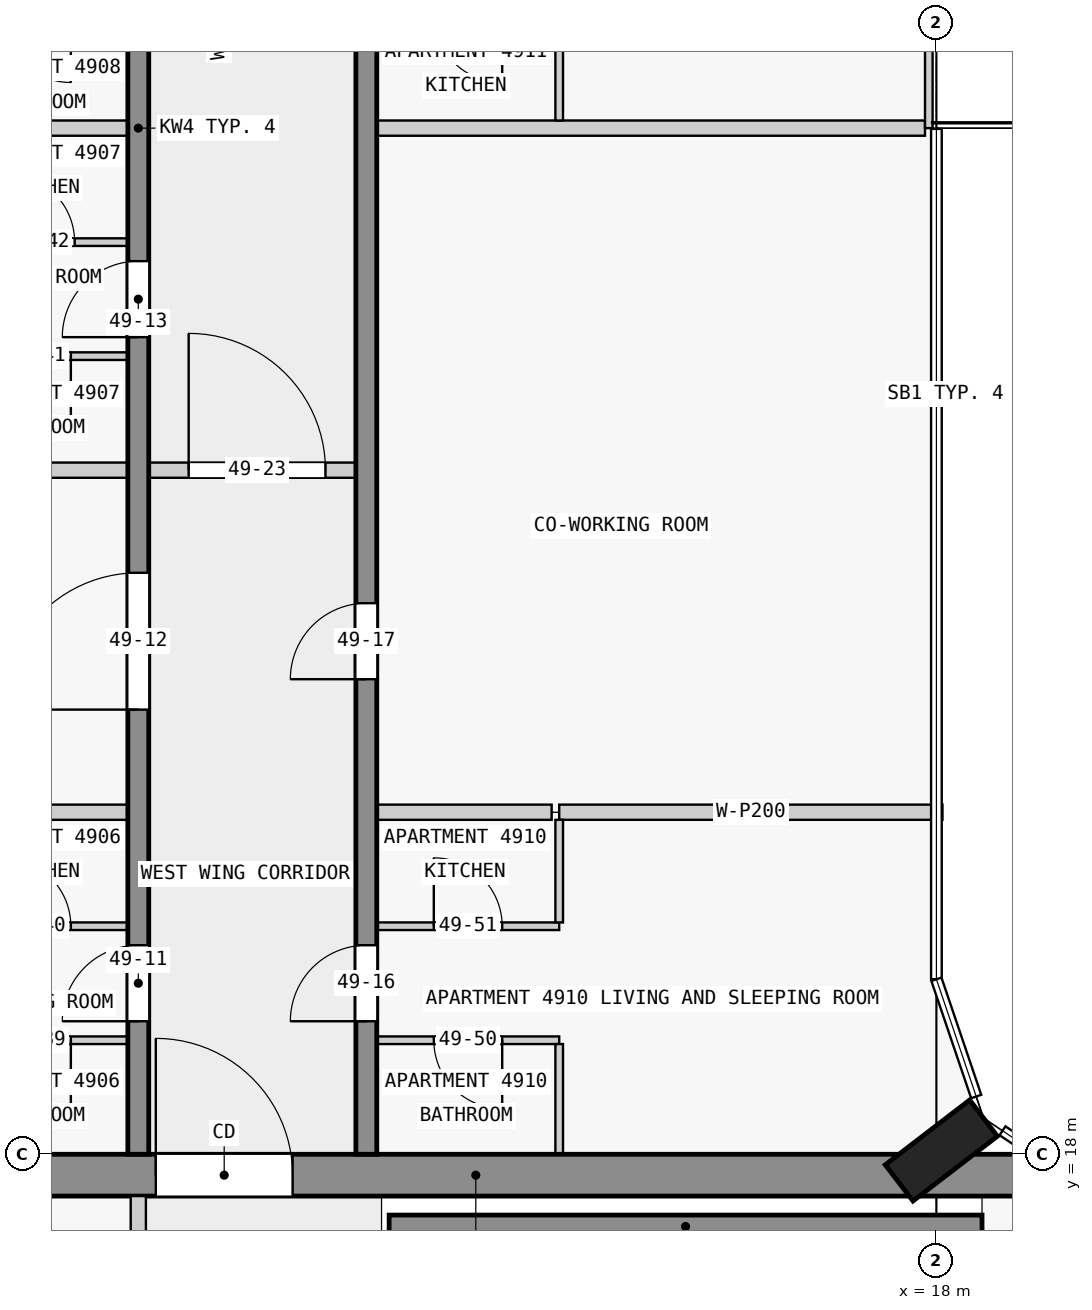
"""IFC4 building model, lengths in metres.
Left out: names, types, materials, properties, quantities, classifications, styles, units other than length and angle.
Written with IfcOpenShell. Run it as: python <this file> out.ifc"""

import sys

from ifc_helpers import new_model, si_unit, direction, frame, frame_2d, origin, origin_2d, place, context, subcontext, project, spatial, rectangle, extrude, element, fill, save


model = new_model("IFC4")
c1 = context("Model", 3, precision=1e-05, world=origin(), true_north=direction((0.0, 1.0)))
c2 = subcontext(c1, "Body", "Model", "MODEL_VIEW")
j1 = project(units=[si_unit("LENGTHUNIT", "METRE"), si_unit("PLANEANGLEUNIT", "RADIAN")], contexts=[c1])
p1 = place(None, origin())
s1 = spatial("IfcSite", under=j1, at=p1, CompositionType="ELEMENT")
p2 = place(p1, origin())
s2 = spatial("IfcBuilding", under=s1, at=p2, CompositionType="ELEMENT")
p3 = place(p2, frame((0.0, 0.0, 190.9)))
s3 = spatial("IfcBuildingStorey", under=s2, at=p3, CompositionType="ELEMENT", Elevation=190.9)
p4 = place(p3, frame((18.065, 18.05, 0.0), z_axis=(0.0, 0.0, 1.0), x_axis=(-0.608810846443, 0.793315418515, 0.0)))
e1 = element("IfcColumn", 1, at=p4, inside=s3, PredefinedType="COLUMN", context=c2, shape_type="SweptSolid", body=[
    extrude(rectangle(XDim=0.6, YDim=1.4, at=origin_2d()), origin(), (0.0, 0.0, 1.0), 3.5),
])
p5 = place(p3, frame((1.38, 17.725, 0.0), z_axis=(0.0, 0.0, 1.0), x_axis=(1.0, 0.0, 0.0)))
e2 = element("IfcWall", 2, at=p5, inside=s3, PredefinedType="SHEAR", context=c2, shape_type="SweptSolid", body=[
    extrude(rectangle(XDim=21.12, YDim=0.55, at=frame_2d((10.56, 0.0))), origin(), (0.0, 0.0, 1.0), 3.25),
])
p6 = place(p5, frame((6.35, 0.0, 0.0)))
e3 = element("IfcOpeningElement", 3, at=p6, cuts=e2, PredefinedType="OPENING", context=c2, shape_type="SweptSolid", body=[
    extrude(rectangle(XDim=1.8, YDim=2.1, at=frame_2d((0.9, 1.05))), frame((0.0, 0.285, 0.0), z_axis=(0.0, -1.0, 0.0), x_axis=(1.0, 0.0, 0.0)), (0.0, 0.0, 1.0), 0.57),
])
p7 = place(p3, frame((10.8, 17.05, 0.0), z_axis=(0.0, 0.0, 1.0), x_axis=(1.0, 0.0, 0.0)))
e4 = element("IfcWall", 4, at=p7, inside=s3, PredefinedType="SHEAR", context=c2, shape_type="SweptSolid", body=[
    extrude(rectangle(XDim=7.8, YDim=0.3, at=frame_2d((3.9, 0.0))), origin(), (0.0, 0.0, 1.0), 3.25),
])
p8 = place(p3, frame((7.5, 18.0, 0.0), z_axis=(0.0, 0.0, 1.0), x_axis=(0.0, 1.0, 0.0)))
e5 = element("IfcWall", 5, at=p8, inside=s3, PredefinedType="SHEAR", context=c2, shape_type="SweptSolid", body=[
    extrude(rectangle(XDim=27.0, YDim=0.275, at=frame_2d((13.5, 0.0))), origin(), (0.0, 0.0, 1.0), 3.25),
])
p9 = place(p8, frame((1.75, 0.0, 0.0)))
e6 = element("IfcOpeningElement", 6, at=p9, cuts=e5, PredefinedType="OPENING", context=c2, shape_type="SweptSolid", body=[
    extrude(rectangle(XDim=1.0, YDim=2.1, at=frame_2d((0.5, 1.05))), frame((0.0, 0.147, 0.0), z_axis=(0.0, -1.0, 0.0), x_axis=(1.0, 0.0, 0.0)), (0.0, 0.0, 1.0), 0.295),
])
p10 = place(p8, frame((5.85, 0.0, 0.0)))
e7 = element("IfcOpeningElement", 7, at=p10, cuts=e5, PredefinedType="OPENING", context=c2, shape_type="SweptSolid", body=[
    extrude(rectangle(XDim=1.8, YDim=2.1, at=frame_2d((0.9, 1.05))), frame((0.0, 0.147, 0.0), z_axis=(0.0, -1.0, 0.0), x_axis=(1.0, 0.0, 0.0)), (0.0, 0.0, 1.0), 0.295),
])
p11 = place(p8, frame((10.75, 0.0, 0.0)))
e8 = element("IfcOpeningElement", 8, at=p11, cuts=e5, PredefinedType="OPENING", context=c2, shape_type="SweptSolid", body=[
    extrude(rectangle(XDim=1.0, YDim=2.1, at=frame_2d((0.5, 1.05))), frame((0.0, 0.147, 0.0), z_axis=(0.0, -1.0, 0.0), x_axis=(1.0, 0.0, 0.0)), (0.0, 0.0, 1.0), 0.295),
])
p12 = place(p8, frame((15.25, 0.0, 0.0)))
e9 = element("IfcOpeningElement", 9, at=p12, cuts=e5, PredefinedType="OPENING", context=c2, shape_type="SweptSolid", body=[
    extrude(rectangle(XDim=1.0, YDim=2.1, at=frame_2d((0.5, 1.05))), frame((0.0, 0.147, 0.0), z_axis=(0.0, -1.0, 0.0), x_axis=(1.0, 0.0, 0.0)), (0.0, 0.0, 1.0), 0.295),
])
p13 = place(p8, frame((21.35, 0.0, 0.0)))
e10 = element("IfcOpeningElement", 10, at=p13, cuts=e5, PredefinedType="OPENING", context=c2, shape_type="SweptSolid", body=[
    extrude(rectangle(XDim=1.0, YDim=2.1, at=frame_2d((0.5, 1.05))), frame((0.0, 0.147, 0.0), z_axis=(0.0, -1.0, 0.0), x_axis=(1.0, 0.0, 0.0)), (0.0, 0.0, 1.0), 0.295),
])
p14 = place(p3, frame((10.5, 18.0, 0.0), z_axis=(0.0, 0.0, 1.0), x_axis=(0.0, 1.0, 0.0)))
e11 = element("IfcWall", 11, at=p14, inside=s3, PredefinedType="SHEAR", context=c2, shape_type="SweptSolid", body=[
    extrude(rectangle(XDim=27.0, YDim=0.275, at=frame_2d((13.5, 0.0))), origin(), (0.0, 0.0, 1.0), 3.25),
])
p15 = place(p14, frame((1.75, 0.0, 0.0)))
e12 = element("IfcOpeningElement", 12, at=p15, cuts=e11, PredefinedType="OPENING", context=c2, shape_type="SweptSolid", body=[
    extrude(rectangle(XDim=1.0, YDim=2.1, at=frame_2d((0.5, 1.05))), frame((0.0, 0.147, 0.0), z_axis=(0.0, -1.0, 0.0), x_axis=(1.0, 0.0, 0.0)), (0.0, 0.0, 1.0), 0.295),
])
p16 = place(p14, frame((6.25, 0.0, 0.0)))
e13 = element("IfcOpeningElement", 13, at=p16, cuts=e11, PredefinedType="OPENING", context=c2, shape_type="SweptSolid", body=[
    extrude(rectangle(XDim=1.0, YDim=2.1, at=frame_2d((0.5, 1.05))), frame((0.0, 0.147, 0.0), z_axis=(0.0, -1.0, 0.0), x_axis=(1.0, 0.0, 0.0)), (0.0, 0.0, 1.0), 0.295),
])
p17 = place(p14, frame((15.25, 0.0, 0.0)))
e14 = element("IfcOpeningElement", 14, at=p17, cuts=e11, PredefinedType="OPENING", context=c2, shape_type="SweptSolid", body=[
    extrude(rectangle(XDim=1.0, YDim=2.1, at=frame_2d((0.5, 1.05))), frame((0.0, 0.147, 0.0), z_axis=(0.0, -1.0, 0.0), x_axis=(1.0, 0.0, 0.0)), (0.0, 0.0, 1.0), 0.295),
])
p18 = place(p14, frame((19.75, 0.0, 0.0)))
e15 = element("IfcOpeningElement", 15, at=p18, cuts=e11, PredefinedType="OPENING", context=c2, shape_type="SweptSolid", body=[
    extrude(rectangle(XDim=1.0, YDim=2.1, at=frame_2d((0.5, 1.05))), frame((0.0, 0.147, 0.0), z_axis=(0.0, -1.0, 0.0), x_axis=(1.0, 0.0, 0.0)), (0.0, 0.0, 1.0), 0.295),
])
p19 = place(p14, frame((23.25, 0.0, 0.0)))
e16 = element("IfcOpeningElement", 16, at=p19, cuts=e11, PredefinedType="OPENING", context=c2, shape_type="SweptSolid", body=[
    extrude(rectangle(XDim=0.9, YDim=2.1, at=frame_2d((0.45, 1.05))), frame((0.0, 0.147, 0.0), z_axis=(0.0, -1.0, 0.0), x_axis=(1.0, 0.0, 0.0)), (0.0, 0.0, 1.0), 0.295),
])
p20 = place(p14, frame((25.45, 0.0, 0.0)))
e17 = element("IfcOpeningElement", 17, at=p20, cuts=e11, PredefinedType="OPENING", context=c2, shape_type="SweptSolid", body=[
    extrude(rectangle(XDim=1.0, YDim=2.1, at=frame_2d((0.5, 1.05))), frame((0.0, 0.147, 0.0), z_axis=(0.0, -1.0, 0.0), x_axis=(1.0, 0.0, 0.0)), (0.0, 0.0, 1.0), 0.295),
])
p21 = place(p3, frame((17.9, 36.0, 0.0), z_axis=(0.0, 0.0, 1.0), x_axis=(0.0, -1.0, 0.0)))
e18 = element("IfcWall", 18, at=p21, inside=s3, PredefinedType="STANDARD", context=c2, shape_type="SweptSolid", body=[
    extrude(rectangle(XDim=4.5, YDim=0.1, at=frame_2d((2.25, 0.0))), origin(), (0.0, 0.0, 1.0), 3.25),
])
p22 = place(p21, frame((1.05, 0.0, 0.0)))
e19 = element("IfcOpeningElement", 19, at=p22, cuts=e18, PredefinedType="OPENING", context=c2, shape_type="SweptSolid", body=[
    extrude(rectangle(XDim=2.4, YDim=2.4, at=frame_2d((1.2, 1.2))), frame((0.0, 0.06, 0.0), z_axis=(0.0, -1.0, 0.0), x_axis=(1.0, 0.0, 0.0)), (0.0, 0.0, 1.0), 0.12),
])
p23 = place(p3, frame((7.5, 10.1, 0.0), z_axis=(0.0, 0.0, 1.0), x_axis=(0.0, 1.0, 0.0)))
e20 = element("IfcWall", 20, at=p23, inside=s3, PredefinedType="PARTITIONING", context=c2, shape_type="SweptSolid", body=[
    extrude(rectangle(XDim=7.35, YDim=0.2, at=frame_2d((3.675, 0.0))), origin(), (0.0, 0.0, 1.0), 3.25),
])
p24 = place(p23, frame((1.5, 0.0, 0.0)))
e21 = element("IfcOpeningElement", 21, at=p24, cuts=e20, PredefinedType="OPENING", context=c2, shape_type="SweptSolid", body=[
    extrude(rectangle(XDim=0.9, YDim=2.1, at=frame_2d((0.45, 1.05))), frame((0.0, 0.11, 0.0), z_axis=(0.0, -1.0, 0.0), x_axis=(1.0, 0.0, 0.0)), (0.0, 0.0, 1.0), 0.22),
])
p25 = place(p23, frame((5.175, 0.0, 0.0)))
e22 = element("IfcOpeningElement", 22, at=p25, cuts=e20, PredefinedType="OPENING", context=c2, shape_type="SweptSolid", body=[
    extrude(rectangle(XDim=0.9, YDim=2.1, at=frame_2d((0.45, 1.05))), frame((0.0, 0.11, 0.0), z_axis=(0.0, -1.0, 0.0), x_axis=(1.0, 0.0, 0.0)), (0.0, 0.0, 1.0), 0.22),
])
p26 = place(p3, frame((7.363, 19.5, 0.0), z_axis=(0.0, 0.0, 1.0), x_axis=(-1.0, 0.0, 0.0)))
e23 = element("IfcWall", 23, at=p26, inside=s3, PredefinedType="PARTITIONING", context=c2, shape_type="SweptSolid", body=[
    extrude(rectangle(XDim=2.4, YDim=0.1, at=frame_2d((1.2, 0.0))), origin(), (0.0, 0.0, 1.0), 3.25),
])
p27 = place(p26, frame((0.75, 0.0, 0.0)))
e24 = element("IfcOpeningElement", 24, at=p27, cuts=e23, PredefinedType="OPENING", context=c2, shape_type="SweptSolid", body=[
    extrude(rectangle(XDim=0.9, YDim=2.1, at=frame_2d((0.45, 1.05))), frame((0.0, 0.06, 0.0), z_axis=(0.0, -1.0, 0.0), x_axis=(1.0, 0.0, 0.0)), (0.0, 0.0, 1.0), 0.12),
])
p28 = place(p3, frame((13.038, 19.5, 0.0), z_axis=(0.0, 0.0, 1.0), x_axis=(-1.0, 0.0, 0.0)))
e25 = element("IfcWall", 25, at=p28, inside=s3, PredefinedType="PARTITIONING", context=c2, shape_type="SweptSolid", body=[
    extrude(rectangle(XDim=2.4, YDim=0.1, at=frame_2d((1.2, 0.0))), origin(), (0.0, 0.0, 1.0), 3.25),
])
p29 = place(p28, frame((0.75, 0.0, 0.0)))
e26 = element("IfcOpeningElement", 26, at=p29, cuts=e25, PredefinedType="OPENING", context=c2, shape_type="SweptSolid", body=[
    extrude(rectangle(XDim=0.9, YDim=2.1, at=frame_2d((0.45, 1.05))), frame((0.0, 0.06, 0.0), z_axis=(0.0, -1.0, 0.0), x_axis=(1.0, 0.0, 0.0)), (0.0, 0.0, 1.0), 0.12),
])
p30 = place(p3, frame((4.962, 21.0, 0.0), z_axis=(0.0, 0.0, 1.0), x_axis=(1.0, 0.0, 0.0)))
e27 = element("IfcWall", 27, at=p30, inside=s3, PredefinedType="PARTITIONING", context=c2, shape_type="SweptSolid", body=[
    extrude(rectangle(XDim=2.4, YDim=0.1, at=frame_2d((1.2, 0.0))), origin(), (0.0, 0.0, 1.0), 3.25),
])
p31 = place(p30, frame((0.75, 0.0, 0.0)))
e28 = element("IfcOpeningElement", 28, at=p31, cuts=e27, PredefinedType="OPENING", context=c2, shape_type="SweptSolid", body=[
    extrude(rectangle(XDim=0.9, YDim=2.1, at=frame_2d((0.45, 1.05))), frame((0.0, 0.06, 0.0), z_axis=(0.0, -1.0, 0.0), x_axis=(1.0, 0.0, 0.0)), (0.0, 0.0, 1.0), 0.12),
])
p32 = place(p3, frame((10.637, 21.0, 0.0), z_axis=(0.0, 0.0, 1.0), x_axis=(1.0, 0.0, 0.0)))
e29 = element("IfcWall", 29, at=p32, inside=s3, PredefinedType="PARTITIONING", context=c2, shape_type="SweptSolid", body=[
    extrude(rectangle(XDim=2.4, YDim=0.1, at=frame_2d((1.2, 0.0))), origin(), (0.0, 0.0, 1.0), 3.25),
])
p33 = place(p32, frame((0.75, 0.0, 0.0)))
e30 = element("IfcOpeningElement", 30, at=p33, cuts=e29, PredefinedType="OPENING", context=c2, shape_type="SweptSolid", body=[
    extrude(rectangle(XDim=0.9, YDim=2.1, at=frame_2d((0.45, 1.05))), frame((0.0, 0.06, 0.0), z_axis=(0.0, -1.0, 0.0), x_axis=(1.0, 0.0, 0.0)), (0.0, 0.0, 1.0), 0.12),
])
for number, where, z_axis, x_axis in (
    (31, (7.363, 22.5, 0.0), (0.0, 0.0, 1.0), (-1.0, 0.0, 0.0)),
    (32, (12.938, 22.5, 0.0), (0.0, 0.0, 1.0), (-1.0, 0.0, 0.0)),
):
    element("IfcWall", number, at=place(p3, frame(where, z_axis=z_axis, x_axis=x_axis)), inside=s3, PredefinedType="PARTITIONING", context=c2, shape_type="SweptSolid", body=[
        extrude(rectangle(XDim=2.3, YDim=0.2, at=frame_2d((1.15, 0.0))), origin(), (0.0, 0.0, 1.0), 3.25),
    ])
p34 = place(p3, frame((13.038, 22.5, 0.0), z_axis=(0.0, 0.0, 1.0), x_axis=(1.0, 0.0, 0.0)))
e33 = element("IfcWall", 33, at=p34, inside=s3, PredefinedType="PARTITIONING", context=c2, shape_type="SweptSolid", body=[
    extrude(rectangle(XDim=5.042, YDim=0.2, at=frame_2d((2.521, 0.0))), origin(), (0.0, 0.0, 1.0), 3.25),
])
p35 = place(p3, frame((7.363, 27.0, 0.0), z_axis=(0.0, 0.0, 1.0), x_axis=(-1.0, 0.0, 0.0)))
e34 = element("IfcWall", 34, at=p35, inside=s3, PredefinedType="PARTITIONING", context=c2, shape_type="SweptSolid", body=[
    extrude(rectangle(XDim=7.443, YDim=0.2, at=frame_2d((3.721, 0.0))), origin(), (0.0, 0.0, 1.0), 3.25),
])
p36 = place(p3, frame((7.363, 28.5, 0.0), z_axis=(0.0, 0.0, 1.0), x_axis=(-1.0, 0.0, 0.0)))
e35 = element("IfcWall", 35, at=p36, inside=s3, PredefinedType="PARTITIONING", context=c2, shape_type="SweptSolid", body=[
    extrude(rectangle(XDim=2.4, YDim=0.1, at=frame_2d((1.2, 0.0))), origin(), (0.0, 0.0, 1.0), 3.25),
])
p37 = place(p36, frame((0.75, 0.0, 0.0)))
e36 = element("IfcOpeningElement", 36, at=p37, cuts=e35, PredefinedType="OPENING", context=c2, shape_type="SweptSolid", body=[
    extrude(rectangle(XDim=0.9, YDim=2.1, at=frame_2d((0.45, 1.05))), frame((0.0, 0.06, 0.0), z_axis=(0.0, -1.0, 0.0), x_axis=(1.0, 0.0, 0.0)), (0.0, 0.0, 1.0), 0.12),
])
p38 = place(p3, frame((5.012, 30.0, 0.0), z_axis=(0.0, 0.0, 1.0), x_axis=(1.0, 0.0, 0.0)))
e37 = element("IfcWall", 37, at=p38, inside=s3, PredefinedType="PARTITIONING", context=c2, shape_type="SweptSolid", body=[
    extrude(rectangle(XDim=2.35, YDim=0.1, at=frame_2d((1.175, 0.0))), origin(), (0.0, 0.0, 1.0), 3.25),
])
p39 = place(p38, frame((0.75, 0.0, 0.0)))
e38 = element("IfcOpeningElement", 38, at=p39, cuts=e37, PredefinedType="OPENING", context=c2, shape_type="SweptSolid", body=[
    extrude(rectangle(XDim=0.9, YDim=2.1, at=frame_2d((0.45, 1.05))), frame((0.0, 0.06, 0.0), z_axis=(0.0, -1.0, 0.0), x_axis=(1.0, 0.0, 0.0)), (0.0, 0.0, 1.0), 0.12),
])
p40 = place(p3, frame((7.363, 31.5, 0.0), z_axis=(0.0, 0.0, 1.0), x_axis=(-1.0, 0.0, 0.0)))
e39 = element("IfcWall", 39, at=p40, inside=s3, PredefinedType="PARTITIONING", context=c2, shape_type="SweptSolid", body=[
    extrude(rectangle(XDim=2.3, YDim=0.2, at=frame_2d((1.15, 0.0))), origin(), (0.0, 0.0, 1.0), 3.25),
])
p41 = place(p3, frame((17.85, 31.5, 0.0), z_axis=(0.0, 0.0, 1.0), x_axis=(-1.0, 0.0, 0.0)))
e40 = element("IfcWall", 40, at=p41, inside=s3, PredefinedType="PARTITIONING", context=c2, shape_type="SweptSolid", body=[
    extrude(rectangle(XDim=7.213, YDim=0.2, at=frame_2d((3.606, 0.0))), origin(), (0.0, 0.0, 1.0), 3.25),
])
p42 = place(p3, frame((13.038, 18.0, 0.0), z_axis=(0.0, 0.0, 1.0), x_axis=(0.0, 1.0, 0.0)))
e41 = element("IfcWall", 41, at=p42, inside=s3, PredefinedType="PARTITIONING", context=c2, shape_type="SweptSolid", body=[
    extrude(rectangle(XDim=1.45, YDim=0.1, at=frame_2d((0.725, 0.0))), origin(), (0.0, 0.0, 1.0), 3.25),
])
for number, where, z_axis, x_axis in (
    (42, (13.038, 21.05, 0.0), (0.0, 0.0, 1.0), (0.0, 1.0, 0.0)),
    (43, (13.038, 31.6, 0.0), (0.0, 0.0, 1.0), (0.0, 1.0, 0.0)),
):
    element("IfcWall", number, at=place(p3, frame(where, z_axis=z_axis, x_axis=x_axis)), inside=s3, PredefinedType="PARTITIONING", context=c2, shape_type="SweptSolid", body=[
        extrude(rectangle(XDim=1.35, YDim=0.1, at=frame_2d((0.675, 0.0))), origin(), (0.0, 0.0, 1.0), 3.25),
    ])
p43 = place(p3, frame((7.462, 27.0, 0.0), z_axis=(0.0, 0.0, 1.0), x_axis=(1.0, 0.0, 0.0)))
e44 = element("IfcWall", 44, at=p43, inside=s3, PredefinedType="PARTITIONING", context=c2, shape_type="SweptSolid", body=[
    extrude(rectangle(XDim=3.175, YDim=0.2, at=frame_2d((1.587, 0.0))), origin(), (0.0, 0.0, 1.0), 3.25),
])
p44 = place(p43, frame((0.7, 0.0, 0.0)))
e45 = element("IfcOpeningElement", 45, at=p44, cuts=e44, PredefinedType="OPENING", context=c2, shape_type="SweptSolid", body=[
    extrude(rectangle(XDim=1.8, YDim=2.1, at=frame_2d((0.9, 1.05))), frame((0.0, 0.11, 0.0), z_axis=(0.0, -1.0, 0.0), x_axis=(1.0, 0.0, 0.0)), (0.0, 0.0, 1.0), 0.22),
])
p45 = place(p6, origin())
e46 = element("IfcDoor", 46, at=p45, inside=s3, OperationType="DOUBLE_DOOR_SINGLE_SWING", PredefinedType="DOOR", context=c2, shape_type="SweptSolid", body=[
    extrude(rectangle(XDim=1.8, YDim=2.1, at=frame_2d((0.9, 1.05))), frame((0.0, 0.025, 0.0), z_axis=(0.0, -1.0, 0.0), x_axis=(1.0, 0.0, 0.0)), (0.0, 0.0, 1.0), 0.05),
])
fill(e3, e46)
p46 = place(p9, origin())
e47 = element("IfcDoor", 47, at=p46, inside=s3, OperationType="SINGLE_SWING_LEFT", PredefinedType="DOOR", context=c2, shape_type="SweptSolid", body=[
    extrude(rectangle(XDim=1.0, YDim=2.1, at=frame_2d((0.5, 1.05))), frame((0.0, 0.025, 0.0), z_axis=(0.0, -1.0, 0.0), x_axis=(1.0, 0.0, 0.0)), (0.0, 0.0, 1.0), 0.05),
])
fill(e6, e47)
p47 = place(p10, origin())
e48 = element("IfcDoor", 48, at=p47, inside=s3, OperationType="SINGLE_SWING_LEFT", PredefinedType="DOOR", context=c2, shape_type="SweptSolid", body=[
    extrude(rectangle(XDim=1.8, YDim=2.1, at=frame_2d((0.9, 1.05))), frame((0.0, 0.025, 0.0), z_axis=(0.0, -1.0, 0.0), x_axis=(1.0, 0.0, 0.0)), (0.0, 0.0, 1.0), 0.05),
])
fill(e7, e48)
p48 = place(p11, origin())
e49 = element("IfcDoor", 49, at=p48, inside=s3, OperationType="SINGLE_SWING_LEFT", PredefinedType="DOOR", context=c2, shape_type="SweptSolid", body=[
    extrude(rectangle(XDim=1.0, YDim=2.1, at=frame_2d((0.5, 1.05))), frame((0.0, 0.025, 0.0), z_axis=(0.0, -1.0, 0.0), x_axis=(1.0, 0.0, 0.0)), (0.0, 0.0, 1.0), 0.05),
])
fill(e8, e49)
p49 = place(p15, origin())
e50 = element("IfcDoor", 50, at=p49, inside=s3, OperationType="SINGLE_SWING_LEFT", PredefinedType="DOOR", context=c2, shape_type="SweptSolid", body=[
    extrude(rectangle(XDim=1.0, YDim=2.1, at=frame_2d((0.5, 1.05))), frame((0.0, 0.025, 0.0), z_axis=(0.0, -1.0, 0.0), x_axis=(1.0, 0.0, 0.0)), (0.0, 0.0, 1.0), 0.05),
])
fill(e12, e50)
p50 = place(p16, origin())
e51 = element("IfcDoor", 51, at=p50, inside=s3, OperationType="SINGLE_SWING_LEFT", PredefinedType="DOOR", context=c2, shape_type="SweptSolid", body=[
    extrude(rectangle(XDim=1.0, YDim=2.1, at=frame_2d((0.5, 1.05))), frame((0.0, 0.025, 0.0), z_axis=(0.0, -1.0, 0.0), x_axis=(1.0, 0.0, 0.0)), (0.0, 0.0, 1.0), 0.05),
])
fill(e13, e51)
p51 = place(p44, origin())
e52 = element("IfcDoor", 52, at=p51, inside=s3, OperationType="SINGLE_SWING_RIGHT", PredefinedType="DOOR", context=c2, shape_type="SweptSolid", body=[
    extrude(rectangle(XDim=1.8, YDim=2.1, at=frame_2d((0.9, 1.05))), frame((0.0, 0.025, 0.0), z_axis=(0.0, -1.0, 0.0), x_axis=(1.0, 0.0, 0.0)), (0.0, 0.0, 1.0), 0.05),
])
fill(e45, e52)
p52 = place(p27, origin())
e53 = element("IfcDoor", 53, at=p52, inside=s3, OperationType="SINGLE_SWING_RIGHT", PredefinedType="DOOR", context=c2, shape_type="SweptSolid", body=[
    extrude(rectangle(XDim=0.9, YDim=2.1, at=frame_2d((0.45, 1.05))), frame((0.0, 0.025, 0.0), z_axis=(0.0, -1.0, 0.0), x_axis=(1.0, 0.0, 0.0)), (0.0, 0.0, 1.0), 0.05),
])
fill(e24, e53)
p53 = place(p31, origin())
e54 = element("IfcDoor", 54, at=p53, inside=s3, OperationType="SINGLE_SWING_RIGHT", PredefinedType="DOOR", context=c2, shape_type="SweptSolid", body=[
    extrude(rectangle(XDim=0.9, YDim=2.1, at=frame_2d((0.45, 1.05))), frame((0.0, 0.025, 0.0), z_axis=(0.0, -1.0, 0.0), x_axis=(1.0, 0.0, 0.0)), (0.0, 0.0, 1.0), 0.05),
])
fill(e28, e54)
p54 = place(p37, origin())
e55 = element("IfcDoor", 55, at=p54, inside=s3, OperationType="SINGLE_SWING_RIGHT", PredefinedType="DOOR", context=c2, shape_type="SweptSolid", body=[
    extrude(rectangle(XDim=0.9, YDim=2.1, at=frame_2d((0.45, 1.05))), frame((0.0, 0.025, 0.0), z_axis=(0.0, -1.0, 0.0), x_axis=(1.0, 0.0, 0.0)), (0.0, 0.0, 1.0), 0.05),
])
fill(e36, e55)
p55 = place(p39, origin())
e56 = element("IfcDoor", 56, at=p55, inside=s3, OperationType="SINGLE_SWING_RIGHT", PredefinedType="DOOR", context=c2, shape_type="SweptSolid", body=[
    extrude(rectangle(XDim=0.9, YDim=2.1, at=frame_2d((0.45, 1.05))), frame((0.0, 0.025, 0.0), z_axis=(0.0, -1.0, 0.0), x_axis=(1.0, 0.0, 0.0)), (0.0, 0.0, 1.0), 0.05),
])
fill(e38, e56)
p56 = place(p29, origin())
e57 = element("IfcDoor", 57, at=p56, inside=s3, OperationType="SINGLE_SWING_LEFT", PredefinedType="DOOR", context=c2, shape_type="SweptSolid", body=[
    extrude(rectangle(XDim=0.9, YDim=2.1, at=frame_2d((0.45, 1.05))), frame((0.0, 0.025, 0.0), z_axis=(0.0, -1.0, 0.0), x_axis=(1.0, 0.0, 0.0)), (0.0, 0.0, 1.0), 0.05),
])
fill(e26, e57)
p57 = place(p33, origin())
e58 = element("IfcDoor", 58, at=p57, inside=s3, OperationType="SINGLE_SWING_LEFT", PredefinedType="DOOR", context=c2, shape_type="SweptSolid", body=[
    extrude(rectangle(XDim=0.9, YDim=2.1, at=frame_2d((0.45, 1.05))), frame((0.0, 0.025, 0.0), z_axis=(0.0, -1.0, 0.0), x_axis=(1.0, 0.0, 0.0)), (0.0, 0.0, 1.0), 0.05),
])
fill(e30, e58)
save(model, sys.argv[1])
